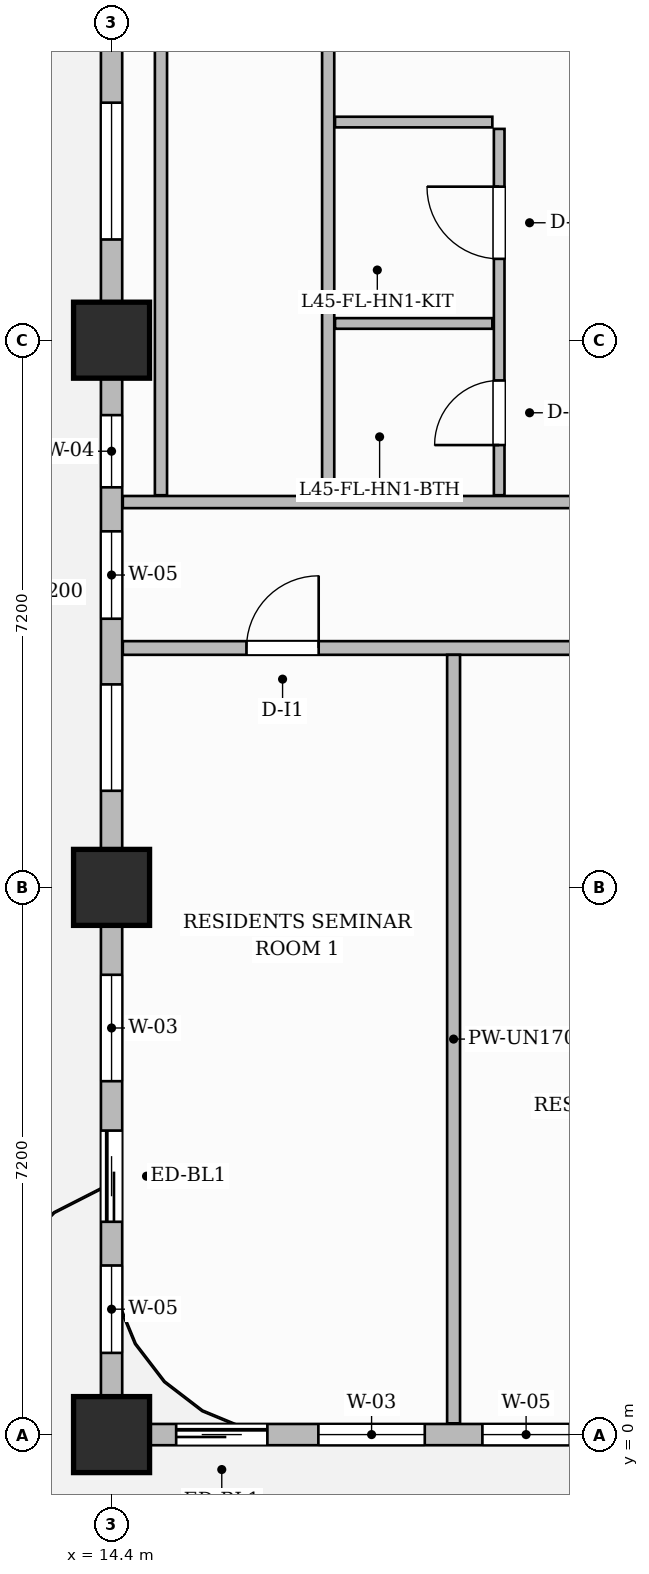
"""IFC4 building model, lengths in metres.
Left out: names, types, materials, properties, quantities, classifications, styles, units other than length and angle.
Written with IfcOpenShell. Run it as: python <this file> out.ifc"""

import sys

from ifc_helpers import new_model, si_unit, direction, frame, frame_2d, origin, origin_2d, place, context, subcontext, project, spatial, rectangle, extrude, source, transform, mapped, element, fill, save


model = new_model("IFC4")
c1 = context("Model", 3, precision=1e-05, world=origin(), true_north=direction((0.0, 1.0)))
c2 = subcontext(c1, "Body", "Model", "MODEL_VIEW")
j1 = project(units=[si_unit("LENGTHUNIT", "METRE"), si_unit("PLANEANGLEUNIT", "RADIAN")], contexts=[c1])
p1 = place(None, origin())
s1 = spatial("IfcSite", under=j1, at=p1, CompositionType="ELEMENT")
p2 = place(p1, origin())
s2 = spatial("IfcBuilding", under=s1, at=p2, CompositionType="ELEMENT")
p3 = place(p2, frame((0.0, 0.0, 181.1)))
s3 = spatial("IfcBuildingStorey", under=s2, at=p3, CompositionType="ELEMENT", Elevation=181.1)
m1 = source(origin(), c2, "Body", "SweptSolid", [
    extrude(rectangle(XDim=1.0, YDim=1.0, at=origin_2d()), origin(), (0.0, 0.0, 1.0), 3.85),
])
for number, where, z_axis, x_axis in (
    (1, (14.4, 0.0, 0.0), (0.0, 0.0, 1.0), (1.0, 0.0, 0.0)),
    (2, (14.4, 7.2, 0.0), (0.0, 0.0, 1.0), (1.0, 0.0, 0.0)),
    (3, (14.4, 14.4, 0.0), (0.0, 0.0, 1.0), (1.0, 0.0, 0.0)),
):
    element("IfcColumn", number, at=place(p3, frame(where, z_axis=z_axis, x_axis=x_axis)), inside=s3, PredefinedType="COLUMN", context=c2, shape_type="MappedRepresentation", body=[
        mapped(m1, transform((0.0, 0.0, 0.0), scale=1.0)),
    ])
p4 = place(p3, frame((14.548, 10.35, 0.0), z_axis=(0.0, 0.0, 1.0), x_axis=(1.0, 0.0, 0.0)))
e4 = element("IfcWall", 4, at=p4, inside=s3, PredefinedType="PARTITIONING", context=c2, shape_type="SweptSolid", body=[
    extrude(rectangle(XDim=15.562, YDim=0.18, at=frame_2d((7.781, 0.0))), origin(), (0.0, 0.0, 1.0), 3.6),
])
p5 = place(p4, frame((1.627, 0.0, 0.0)))
e5 = element("IfcOpeningElement", 5, at=p5, cuts=e4, PredefinedType="OPENING", context=c2, shape_type="SweptSolid", body=[
    extrude(rectangle(XDim=0.95, YDim=2.15, at=frame_2d((0.475, 1.075))), frame((0.0, 0.1, 0.0), z_axis=(0.0, -1.0, 0.0), x_axis=(1.0, 0.0, 0.0)), (0.0, 0.0, 1.0), 0.2),
])
p6 = place(p4, frame((7.027, 0.0, 0.0)))
e6 = element("IfcOpeningElement", 6, at=p6, cuts=e4, PredefinedType="OPENING", context=c2, shape_type="SweptSolid", body=[
    extrude(rectangle(XDim=0.95, YDim=2.15, at=frame_2d((0.475, 1.075))), frame((0.0, 0.1, 0.0), z_axis=(0.0, -1.0, 0.0), x_axis=(1.0, 0.0, 0.0)), (0.0, 0.0, 1.0), 0.2),
])
p7 = place(p4, frame((12.677, 0.0, 0.0)))
e7 = element("IfcOpeningElement", 7, at=p7, cuts=e4, PredefinedType="OPENING", context=c2, shape_type="SweptSolid", body=[
    extrude(rectangle(XDim=0.95, YDim=2.15, at=frame_2d((0.475, 1.075))), frame((0.0, 0.1, 0.0), z_axis=(0.0, -1.0, 0.0), x_axis=(1.0, 0.0, 0.0)), (0.0, 0.0, 1.0), 0.2),
])
p8 = place(p3, frame((14.548, 12.27, 0.0), z_axis=(0.0, 0.0, 1.0), x_axis=(1.0, 0.0, 0.0)))
e8 = element("IfcWall", 8, at=p8, inside=s3, PredefinedType="PARTITIONING", context=c2, shape_type="SweptSolid", body=[
    extrude(rectangle(XDim=15.562, YDim=0.16, at=frame_2d((7.781, 0.0))), origin(), (0.0, 0.0, 1.0), 3.6),
])
p9 = place(p8, frame((6.577, 0.0, 0.0)))
e9 = element("IfcOpeningElement", 9, at=p9, cuts=e8, PredefinedType="OPENING", context=c2, shape_type="SweptSolid", body=[
    extrude(rectangle(XDim=1.05, YDim=2.25, at=frame_2d((0.525, 1.125))), frame((0.0, 0.09, 0.0), z_axis=(0.0, -1.0, 0.0), x_axis=(1.0, 0.0, 0.0)), (0.0, 0.0, 1.0), 0.18),
])
p10 = place(p3, frame((18.9, 0.148, 0.0), z_axis=(0.0, 0.0, 1.0), x_axis=(0.0, 1.0, 0.0)))
e10 = element("IfcWall", 10, at=p10, inside=s3, PredefinedType="PARTITIONING", context=c2, shape_type="SweptSolid", body=[
    extrude(rectangle(XDim=10.112, YDim=0.17, at=frame_2d((5.056, 0.0))), origin(), (0.0, 0.0, 1.0), 3.6),
])
for number, where, z_axis, x_axis in (
    (11, (15.05, 12.36, 0.0), (0.0, 0.0, 1.0), (0.0, 1.0, 0.0)),
    (12, (17.25, 12.36, 0.0), (0.0, 0.0, 1.0), (0.0, 1.0, 0.0)),
):
    element("IfcWall", number, at=place(p3, frame(where, z_axis=z_axis, x_axis=x_axis)), inside=s3, PredefinedType="PARTITIONING", context=c2, shape_type="SweptSolid", body=[
        extrude(rectangle(XDim=12.75, YDim=0.16, at=frame_2d((6.375, 0.0))), origin(), (0.0, 0.0, 1.0), 3.6),
    ])
p11 = place(p3, frame((19.5, 12.36, 0.0), z_axis=(0.0, 0.0, 1.0), x_axis=(0.0, 1.0, 0.0)))
e13 = element("IfcWall", 13, at=p11, inside=s3, PredefinedType="PARTITIONING", context=c2, shape_type="SweptSolid", body=[
    extrude(rectangle(XDim=4.82, YDim=0.14, at=frame_2d((2.41, 0.0))), origin(), (0.0, 0.0, 1.0), 3.6),
])
p12 = place(p11, frame((0.66, 0.0, 0.0)))
e14 = element("IfcOpeningElement", 14, at=p12, cuts=e13, PredefinedType="OPENING", context=c2, shape_type="SweptSolid", body=[
    extrude(rectangle(XDim=0.85, YDim=2.1, at=frame_2d((0.425, 1.05))), frame((0.0, 0.08, 0.0), z_axis=(0.0, -1.0, 0.0), x_axis=(1.0, 0.0, 0.0)), (0.0, 0.0, 1.0), 0.16),
])
p13 = place(p11, frame((3.11, 0.0, 0.0)))
e15 = element("IfcOpeningElement", 15, at=p13, cuts=e13, PredefinedType="OPENING", context=c2, shape_type="SweptSolid", body=[
    extrude(rectangle(XDim=0.95, YDim=2.15, at=frame_2d((0.475, 1.075))), frame((0.0, 0.08, 0.0), z_axis=(0.0, -1.0, 0.0), x_axis=(1.0, 0.0, 0.0)), (0.0, 0.0, 1.0), 0.16),
])
p14 = place(p3, frame((17.34, 14.62, 0.0), z_axis=(0.0, 0.0, 1.0), x_axis=(1.0, 0.0, 0.0)))
e16 = element("IfcWall", 16, at=p14, inside=s3, PredefinedType="PARTITIONING", context=c2, shape_type="SweptSolid", body=[
    extrude(rectangle(XDim=2.07, YDim=0.14, at=frame_2d((1.035, 0.0))), origin(), (0.0, 0.0, 1.0), 3.085),
])
p15 = place(p3, frame((17.34, 17.27, 0.0), z_axis=(0.0, 0.0, 1.0), x_axis=(1.0, 0.0, 0.0)))
e17 = element("IfcWall", 17, at=p15, inside=s3, PredefinedType="PARTITIONING", context=c2, shape_type="SweptSolid", body=[
    extrude(rectangle(XDim=2.07, YDim=0.14, at=frame_2d((1.035, 0.0))), origin(), (0.0, 0.0, 1.0), 3.6),
])
p16 = place(p3, frame((14.4, 0.0, 0.0), z_axis=(0.0, 0.0, 1.0), x_axis=(1.0, 0.0, 0.0)))
e18 = element("IfcWall", 18, at=p16, inside=s3, PredefinedType="SOLIDWALL", context=c2, shape_type="SweptSolid", body=[
    extrude(rectangle(XDim=35.4, YDim=0.28, at=frame_2d((17.7, 0.0))), origin(), (0.0, 0.0, 1.0), 3.085),
])
p17 = place(p16, frame((0.85, 0.0, 0.0)))
e19 = element("IfcOpeningElement", 19, at=p17, cuts=e18, PredefinedType="OPENING", context=c2, shape_type="SweptSolid", body=[
    extrude(rectangle(XDim=1.2, YDim=2.2, at=frame_2d((0.6, 1.1))), frame((0.0, 0.15, 0.0), z_axis=(0.0, -1.0, 0.0), x_axis=(1.0, 0.0, 0.0)), (0.0, 0.0, 1.0), 0.3),
])
p18 = place(p16, frame((2.721, 0.0, 0.8)))
e20 = element("IfcOpeningElement", 20, at=p18, cuts=e18, PredefinedType="OPENING", context=c2, shape_type="SweptSolid", body=[
    extrude(rectangle(XDim=1.4, YDim=1.85, at=frame_2d((0.7, 0.925))), frame((0.0, 0.15, 0.0), z_axis=(0.0, -1.0, 0.0), x_axis=(1.0, 0.0, 0.0)), (0.0, 0.0, 1.0), 0.3),
])
p19 = place(p16, frame((4.879, 0.0, 0.8)))
e21 = element("IfcOpeningElement", 21, at=p19, cuts=e18, PredefinedType="OPENING", context=c2, shape_type="SweptSolid", body=[
    extrude(rectangle(XDim=1.15, YDim=1.8, at=frame_2d((0.575, 0.9))), frame((0.0, 0.15, 0.0), z_axis=(0.0, -1.0, 0.0), x_axis=(1.0, 0.0, 0.0)), (0.0, 0.0, 1.0), 0.3),
])
p20 = place(p16, frame((8.496, 0.0, 0.8)))
e22 = element("IfcOpeningElement", 22, at=p20, cuts=e18, PredefinedType="OPENING", context=c2, shape_type="SweptSolid", body=[
    extrude(rectangle(XDim=1.8, YDim=1.85, at=frame_2d((0.9, 0.925))), frame((0.0, 0.15, 0.0), z_axis=(0.0, -1.0, 0.0), x_axis=(1.0, 0.0, 0.0)), (0.0, 0.0, 1.0), 0.3),
])
p21 = place(p16, frame((11.304, 0.0, 0.8)))
e23 = element("IfcOpeningElement", 23, at=p21, cuts=e18, PredefinedType="OPENING", context=c2, shape_type="SweptSolid", body=[
    extrude(rectangle(XDim=1.8, YDim=1.85, at=frame_2d((0.9, 0.925))), frame((0.0, 0.15, 0.0), z_axis=(0.0, -1.0, 0.0), x_axis=(1.0, 0.0, 0.0)), (0.0, 0.0, 1.0), 0.3),
])
p22 = place(p16, frame((16.804, 0.0, 0.8)))
e24 = element("IfcOpeningElement", 24, at=p22, cuts=e18, PredefinedType="OPENING", context=c2, shape_type="SweptSolid", body=[
    extrude(rectangle(XDim=1.8, YDim=1.85, at=frame_2d((0.9, 0.925))), frame((0.0, 0.15, 0.0), z_axis=(0.0, -1.0, 0.0), x_axis=(1.0, 0.0, 0.0)), (0.0, 0.0, 1.0), 0.3),
])
p23 = place(p16, frame((22.396, 0.0, 0.8)))
e25 = element("IfcOpeningElement", 25, at=p23, cuts=e18, PredefinedType="OPENING", context=c2, shape_type="SweptSolid", body=[
    extrude(rectangle(XDim=1.8, YDim=1.85, at=frame_2d((0.9, 0.925))), frame((0.0, 0.15, 0.0), z_axis=(0.0, -1.0, 0.0), x_axis=(1.0, 0.0, 0.0)), (0.0, 0.0, 1.0), 0.3),
])
p24 = place(p16, frame((25.629, 0.0, 0.8)))
e26 = element("IfcOpeningElement", 26, at=p24, cuts=e18, PredefinedType="OPENING", context=c2, shape_type="SweptSolid", body=[
    extrude(rectangle(XDim=0.95, YDim=1.75, at=frame_2d((0.475, 0.875))), frame((0.0, 0.15, 0.0), z_axis=(0.0, -1.0, 0.0), x_axis=(1.0, 0.0, 0.0)), (0.0, 0.0, 1.0), 0.3),
])
p25 = place(p16, frame((29.075, 0.0, 0.8)))
e27 = element("IfcOpeningElement", 27, at=p25, cuts=e18, PredefinedType="OPENING", context=c2, shape_type="SweptSolid", body=[
    extrude(rectangle(XDim=1.8, YDim=1.85, at=frame_2d((0.9, 0.925))), frame((0.0, 0.15, 0.0), z_axis=(0.0, -1.0, 0.0), x_axis=(1.0, 0.0, 0.0)), (0.0, 0.0, 1.0), 0.3),
])
p26 = place(p16, frame((32.125, 0.0, 0.8)))
e28 = element("IfcOpeningElement", 28, at=p26, cuts=e18, PredefinedType="OPENING", context=c2, shape_type="SweptSolid", body=[
    extrude(rectangle(XDim=1.8, YDim=1.85, at=frame_2d((0.9, 0.925))), frame((0.0, 0.15, 0.0), z_axis=(0.0, -1.0, 0.0), x_axis=(1.0, 0.0, 0.0)), (0.0, 0.0, 1.0), 0.3),
])
p27 = place(p3, frame((14.4, 0.05, 0.0), z_axis=(0.0, 0.0, 1.0), x_axis=(0.0, 1.0, 0.0)))
e29 = element("IfcWall", 29, at=p27, inside=s3, PredefinedType="SOLIDWALL", context=c2, shape_type="SweptSolid", body=[
    extrude(rectangle(XDim=25.1, YDim=0.28, at=frame_2d((12.55, 0.0))), origin(), (0.0, 0.0, 1.0), 3.085),
])
p28 = place(p27, frame((2.75, 0.0, 0.0)))
e30 = element("IfcOpeningElement", 30, at=p28, cuts=e29, PredefinedType="OPENING", context=c2, shape_type="SweptSolid", body=[
    extrude(rectangle(XDim=1.2, YDim=2.2, at=frame_2d((0.6, 1.1))), frame((0.0, 0.15, 0.0), z_axis=(0.0, -1.0, 0.0), x_axis=(1.0, 0.0, 0.0)), (0.0, 0.0, 1.0), 0.3),
])
p29 = place(p27, frame((1.025, 0.0, 0.8)))
e31 = element("IfcOpeningElement", 31, at=p29, cuts=e29, PredefinedType="OPENING", context=c2, shape_type="SweptSolid", body=[
    extrude(rectangle(XDim=1.15, YDim=1.8, at=frame_2d((0.575, 0.9))), frame((0.0, 0.15, 0.0), z_axis=(0.0, -1.0, 0.0), x_axis=(1.0, 0.0, 0.0)), (0.0, 0.0, 1.0), 0.3),
])
p30 = place(p27, frame((4.6, 0.0, 0.8)))
e32 = element("IfcOpeningElement", 32, at=p30, cuts=e29, PredefinedType="OPENING", context=c2, shape_type="SweptSolid", body=[
    extrude(rectangle(XDim=1.4, YDim=1.85, at=frame_2d((0.7, 0.925))), frame((0.0, 0.15, 0.0), z_axis=(0.0, -1.0, 0.0), x_axis=(1.0, 0.0, 0.0)), (0.0, 0.0, 1.0), 0.3),
])
p31 = place(p27, frame((8.421, 0.0, 0.8)))
e33 = element("IfcOpeningElement", 33, at=p31, cuts=e29, PredefinedType="OPENING", context=c2, shape_type="SweptSolid", body=[
    extrude(rectangle(XDim=1.4, YDim=1.85, at=frame_2d((0.7, 0.925))), frame((0.0, 0.15, 0.0), z_axis=(0.0, -1.0, 0.0), x_axis=(1.0, 0.0, 0.0)), (0.0, 0.0, 1.0), 0.3),
])
p32 = place(p27, frame((10.685, 0.0, 0.8)))
e34 = element("IfcOpeningElement", 34, at=p32, cuts=e29, PredefinedType="OPENING", context=c2, shape_type="SweptSolid", body=[
    extrude(rectangle(XDim=1.15, YDim=1.8, at=frame_2d((0.575, 0.9))), frame((0.0, 0.15, 0.0), z_axis=(0.0, -1.0, 0.0), x_axis=(1.0, 0.0, 0.0)), (0.0, 0.0, 1.0), 0.3),
])
p33 = place(p27, frame((12.414, 0.0, 0.8)))
e35 = element("IfcOpeningElement", 35, at=p33, cuts=e29, PredefinedType="OPENING", context=c2, shape_type="SweptSolid", body=[
    extrude(rectangle(XDim=0.95, YDim=1.75, at=frame_2d((0.475, 0.875))), frame((0.0, 0.15, 0.0), z_axis=(0.0, -1.0, 0.0), x_axis=(1.0, 0.0, 0.0)), (0.0, 0.0, 1.0), 0.3),
])
p34 = place(p27, frame((15.675, 0.0, 0.8)))
e36 = element("IfcOpeningElement", 36, at=p34, cuts=e29, PredefinedType="OPENING", context=c2, shape_type="SweptSolid", body=[
    extrude(rectangle(XDim=1.8, YDim=1.85, at=frame_2d((0.9, 0.925))), frame((0.0, 0.15, 0.0), z_axis=(0.0, -1.0, 0.0), x_axis=(1.0, 0.0, 0.0)), (0.0, 0.0, 1.0), 0.3),
])
p35 = place(p27, frame((18.425, 0.0, 0.8)))
e37 = element("IfcOpeningElement", 37, at=p35, cuts=e29, PredefinedType="OPENING", context=c2, shape_type="SweptSolid", body=[
    extrude(rectangle(XDim=1.8, YDim=1.85, at=frame_2d((0.9, 0.925))), frame((0.0, 0.15, 0.0), z_axis=(0.0, -1.0, 0.0), x_axis=(1.0, 0.0, 0.0)), (0.0, 0.0, 1.0), 0.3),
])
p36 = place(p27, frame((22.65, 0.0, 0.8)))
e38 = element("IfcOpeningElement", 38, at=p36, cuts=e29, PredefinedType="OPENING", context=c2, shape_type="SweptSolid", body=[
    extrude(rectangle(XDim=1.4, YDim=1.85, at=frame_2d((0.7, 0.925))), frame((0.0, 0.15, 0.0), z_axis=(0.0, -1.0, 0.0), x_axis=(1.0, 0.0, 0.0)), (0.0, 0.0, 1.0), 0.3),
])
m2 = source(origin(), c2, "Body", "SweptSolid", [
    extrude(rectangle(XDim=0.95, YDim=2.15, at=frame_2d((0.475, 1.075))), frame((0.0, 0.025, 0.0), z_axis=(0.0, -1.0, 0.0), x_axis=(1.0, 0.0, 0.0)), (0.0, 0.0, 1.0), 0.05),
])
p37 = place(p5, origin())
e39 = element("IfcDoor", 39, at=p37, inside=s3, OperationType="SINGLE_SWING_RIGHT", PredefinedType="DOOR", context=c2, shape_type="MappedRepresentation", body=[
    mapped(m2, transform((0.0, 0.0, 0.0), scale=1.0)),
])
fill(e5, e39)
m3 = source(origin(), c2, "Body", "SweptSolid", [
    extrude(rectangle(XDim=0.85, YDim=2.1, at=frame_2d((0.425, 1.05))), frame((0.0, 0.025, 0.0), z_axis=(0.0, -1.0, 0.0), x_axis=(1.0, 0.0, 0.0)), (0.0, 0.0, 1.0), 0.05),
])
p38 = place(p12, origin())
e40 = element("IfcDoor", 40, at=p38, inside=s3, OperationType="SINGLE_SWING_LEFT", PredefinedType="DOOR", context=c2, shape_type="MappedRepresentation", body=[
    mapped(m3, transform((0.0, 0.0, 0.0), scale=1.0)),
])
fill(e14, e40)
p39 = place(p13, origin())
e41 = element("IfcDoor", 41, at=p39, inside=s3, OperationType="SINGLE_SWING_RIGHT", PredefinedType="DOOR", context=c2, shape_type="MappedRepresentation", body=[
    mapped(m2, transform((0.0, 0.0, 0.0), scale=1.0)),
])
fill(e15, e41)
m4 = source(origin(), c2, "Body", "SweptSolid", [
    extrude(rectangle(XDim=1.2, YDim=2.2, at=frame_2d((0.6, 1.1))), frame((0.0, 0.025, 0.0), z_axis=(0.0, -1.0, 0.0), x_axis=(1.0, 0.0, 0.0)), (0.0, 0.0, 1.0), 0.05),
])
p40 = place(p17, origin())
e42 = element("IfcDoor", 42, at=p40, inside=s3, OperationType="SLIDING_TO_LEFT", PredefinedType="DOOR", context=c2, shape_type="MappedRepresentation", body=[
    mapped(m4, transform((0.0, 0.0, 0.0), scale=1.0)),
])
fill(e19, e42)
p41 = place(p28, origin())
e43 = element("IfcDoor", 43, at=p41, inside=s3, OperationType="SLIDING_TO_LEFT", PredefinedType="DOOR", context=c2, shape_type="MappedRepresentation", body=[
    mapped(m4, transform((0.0, 0.0, 0.0), scale=1.0)),
])
fill(e30, e43)
m5 = source(origin(), c2, "Body", "SweptSolid", [
    extrude(rectangle(XDim=1.4, YDim=1.85, at=frame_2d((0.7, 0.925))), frame((0.0, 0.03, 0.0), z_axis=(0.0, -1.0, 0.0), x_axis=(1.0, 0.0, 0.0)), (0.0, 0.0, 1.0), 0.06),
])
p42 = place(p18, origin())
e44 = element("IfcWindow", 44, at=p42, inside=s3, PartitioningType="SINGLE_PANEL", PredefinedType="WINDOW", context=c2, shape_type="MappedRepresentation", body=[
    mapped(m5, transform((0.0, 0.0, 0.0), scale=1.0)),
])
fill(e20, e44)
m6 = source(origin(), c2, "Body", "SweptSolid", [
    extrude(rectangle(XDim=1.15, YDim=1.8, at=frame_2d((0.575, 0.9))), frame((0.0, 0.03, 0.0), z_axis=(0.0, -1.0, 0.0), x_axis=(1.0, 0.0, 0.0)), (0.0, 0.0, 1.0), 0.06),
])
p43 = place(p19, origin())
e45 = element("IfcWindow", 45, at=p43, inside=s3, PartitioningType="SINGLE_PANEL", PredefinedType="WINDOW", context=c2, shape_type="MappedRepresentation", body=[
    mapped(m6, transform((0.0, 0.0, 0.0), scale=1.0)),
])
fill(e21, e45)
p44 = place(p29, origin())
e46 = element("IfcWindow", 46, at=p44, inside=s3, PartitioningType="SINGLE_PANEL", PredefinedType="WINDOW", context=c2, shape_type="MappedRepresentation", body=[
    mapped(m6, transform((0.0, 0.0, 0.0), scale=1.0)),
])
fill(e31, e46)
p45 = place(p30, origin())
e47 = element("IfcWindow", 47, at=p45, inside=s3, PartitioningType="SINGLE_PANEL", PredefinedType="WINDOW", context=c2, shape_type="MappedRepresentation", body=[
    mapped(m5, transform((0.0, 0.0, 0.0), scale=1.0)),
])
fill(e32, e47)
p46 = place(p31, origin())
e48 = element("IfcWindow", 48, at=p46, inside=s3, PartitioningType="SINGLE_PANEL", PredefinedType="WINDOW", context=c2, shape_type="MappedRepresentation", body=[
    mapped(m5, transform((0.0, 0.0, 0.0), scale=1.0)),
])
fill(e33, e48)
p47 = place(p32, origin())
e49 = element("IfcWindow", 49, at=p47, inside=s3, PartitioningType="SINGLE_PANEL", PredefinedType="WINDOW", context=c2, shape_type="MappedRepresentation", body=[
    mapped(m6, transform((0.0, 0.0, 0.0), scale=1.0)),
])
fill(e34, e49)
m7 = source(origin(), c2, "Body", "SweptSolid", [
    extrude(rectangle(XDim=0.95, YDim=1.75, at=frame_2d((0.475, 0.875))), frame((0.0, 0.03, 0.0), z_axis=(0.0, -1.0, 0.0), x_axis=(1.0, 0.0, 0.0)), (0.0, 0.0, 1.0), 0.06),
])
p48 = place(p33, origin())
e50 = element("IfcWindow", 50, at=p48, inside=s3, PartitioningType="SINGLE_PANEL", PredefinedType="WINDOW", context=c2, shape_type="MappedRepresentation", body=[
    mapped(m7, transform((0.0, 0.0, 0.0), scale=1.0)),
])
fill(e35, e50)
m8 = source(origin(), c2, "Body", "SweptSolid", [
    extrude(rectangle(XDim=1.8, YDim=1.85, at=frame_2d((0.9, 0.925))), frame((0.0, 0.03, 0.0), z_axis=(0.0, -1.0, 0.0), x_axis=(1.0, 0.0, 0.0)), (0.0, 0.0, 1.0), 0.06),
])
p49 = place(p34, origin())
e51 = element("IfcWindow", 51, at=p49, inside=s3, PartitioningType="DOUBLE_PANEL_VERTICAL", PredefinedType="WINDOW", context=c2, shape_type="MappedRepresentation", body=[
    mapped(m8, transform((0.0, 0.0, 0.0), scale=1.0)),
])
fill(e36, e51)
save(model, sys.argv[1])
